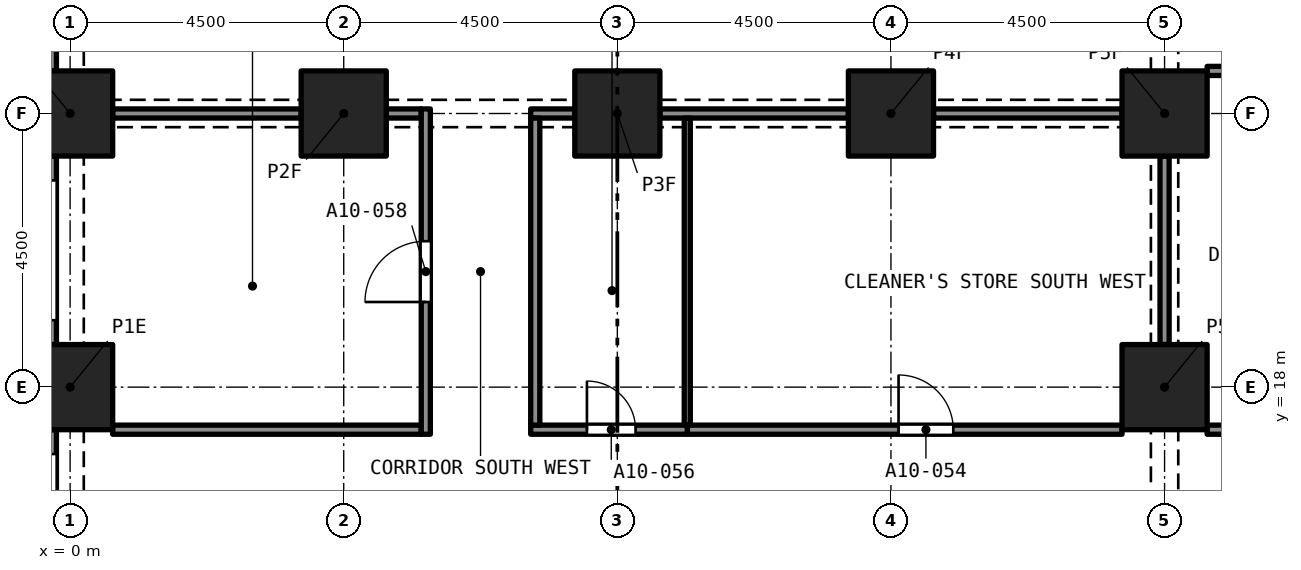
"""IFC4 building model, lengths in metres.
Left out: names, types, materials, properties, quantities, classifications, styles, units other than length and angle.
Written with IfcOpenShell. Run it as: python <this file> out.ifc"""

import sys

from ifc_helpers import new_model, si_unit, direction, frame, frame_2d, origin, origin_2d, place, context, subcontext, project, spatial, rectangle, extrude, element, fill, save


model = new_model("IFC4")
c1 = context("Model", 3, precision=1e-05, world=origin(), true_north=direction((0.0, 1.0)))
c2 = subcontext(c1, "Body", "Model", "MODEL_VIEW")
j1 = project(units=[si_unit("LENGTHUNIT", "METRE"), si_unit("PLANEANGLEUNIT", "RADIAN")], contexts=[c1])
p1 = place(None, origin())
s1 = spatial("IfcSite", under=j1, at=p1, CompositionType="ELEMENT")
p2 = place(p1, origin())
s2 = spatial("IfcBuilding", under=s1, at=p2, CompositionType="ELEMENT")
p3 = place(p2, frame((0.0, 0.0, 43.2)))
s3 = spatial("IfcBuildingStorey", under=s2, at=p3, CompositionType="ELEMENT", Elevation=43.2)
for number, where, z_axis, x_axis in (
    (1, (0.0, 18.0, 0.0), (0.0, 0.0, 1.0), (1.0, 0.0, 0.0)),
    (2, (18.0, 18.0, 0.0), (0.0, 0.0, 1.0), (1.0, 0.0, 0.0)),
    (3, (0.0, 22.5, 0.0), (0.0, 0.0, 1.0), (1.0, 0.0, 0.0)),
    (4, (4.5, 22.5, 0.0), (0.0, 0.0, 1.0), (1.0, 0.0, 0.0)),
    (5, (9.0, 22.5, 0.0), (0.0, 0.0, 1.0), (1.0, 0.0, 0.0)),
    (6, (13.5, 22.5, 0.0), (0.0, 0.0, 1.0), (1.0, 0.0, 0.0)),
    (7, (18.0, 22.5, 0.0), (0.0, 0.0, 1.0), (1.0, 0.0, 0.0)),
):
    element("IfcColumn", number, at=place(p3, frame(where, z_axis=z_axis, x_axis=x_axis)), inside=s3, PredefinedType="COLUMN", context=c2, shape_type="SweptSolid", body=[
        extrude(rectangle(XDim=1.4, YDim=1.4, at=origin_2d()), origin(), (0.0, 0.0, 1.0), 3.2),
    ])
p4 = place(p3, frame((-0.375, 23.2, 0.0), z_axis=(0.0, 0.0, 1.0), x_axis=(0.0, 1.0, 0.0)))
e8 = element("IfcWall", 8, at=p4, inside=s3, PredefinedType="SOLIDWALL", context=c2, shape_type="SweptSolid", body=[
    extrude(rectangle(XDim=3.1, YDim=0.3, at=frame_2d((1.55, 0.0))), origin(), (0.0, 0.0, 1.0), 3.2),
])
p5 = place(p4, frame((0.4, 0.0, 0.45)))
e9 = element("IfcOpeningElement", 9, at=p5, cuts=e8, PredefinedType="OPENING", context=c2, shape_type="SweptSolid", body=[
    extrude(rectangle(XDim=2.3, YDim=1.95, at=frame_2d((1.15, 0.975))), frame((0.0, 0.16, 0.0), z_axis=(0.0, -1.0, 0.0), x_axis=(1.0, 0.0, 0.0)), (0.0, 0.0, 1.0), 0.32),
])
p6 = place(p3, frame((-0.375, 18.7, 0.0), z_axis=(0.0, 0.0, 1.0), x_axis=(0.0, 1.0, 0.0)))
e10 = element("IfcWall", 10, at=p6, inside=s3, PredefinedType="SOLIDWALL", context=c2, shape_type="SweptSolid", body=[
    extrude(rectangle(XDim=3.1, YDim=0.3, at=frame_2d((1.55, 0.0))), origin(), (0.0, 0.0, 1.0), 3.2),
])
p7 = place(p6, frame((0.4, 0.0, 0.45)))
e11 = element("IfcOpeningElement", 11, at=p7, cuts=e10, PredefinedType="OPENING", context=c2, shape_type="SweptSolid", body=[
    extrude(rectangle(XDim=2.3, YDim=1.95, at=frame_2d((1.15, 0.975))), frame((0.0, 0.16, 0.0), z_axis=(0.0, -1.0, 0.0), x_axis=(1.0, 0.0, 0.0)), (0.0, 0.0, 1.0), 0.32),
])
p8 = place(p3, frame((-0.375, 14.2, 0.0), z_axis=(0.0, 0.0, 1.0), x_axis=(0.0, 1.0, 0.0)))
e12 = element("IfcWall", 12, at=p8, inside=s3, PredefinedType="SOLIDWALL", context=c2, shape_type="SweptSolid", body=[
    extrude(rectangle(XDim=3.1, YDim=0.3, at=frame_2d((1.55, 0.0))), origin(), (0.0, 0.0, 1.0), 3.2),
])
p9 = place(p8, frame((0.4, 0.0, 0.45)))
e13 = element("IfcOpeningElement", 13, at=p9, cuts=e12, PredefinedType="OPENING", context=c2, shape_type="SweptSolid", body=[
    extrude(rectangle(XDim=2.3, YDim=1.95, at=frame_2d((1.15, 0.975))), frame((0.0, 0.16, 0.0), z_axis=(0.0, -1.0, 0.0), x_axis=(1.0, 0.0, 0.0)), (0.0, 0.0, 1.0), 0.32),
])
p10 = place(p3, frame((18.7, 17.3, 0.0), z_axis=(0.0, 0.0, 1.0), x_axis=(1.0, 0.0, 0.0)))
e14 = element("IfcWall", 14, at=p10, inside=s3, PredefinedType="PARTITIONING", context=c2, shape_type="SweptSolid", body=[
    extrude(rectangle(XDim=5.075, YDim=0.15, at=frame_2d((2.538, 0.0))), origin(), (0.0, 0.0, 1.0), 2.75),
])
p11 = place(p3, frame((10.15, 17.3, 0.0), z_axis=(0.0, 0.0, 1.0), x_axis=(1.0, 0.0, 0.0)))
e15 = element("IfcWall", 15, at=p11, inside=s3, PredefinedType="PARTITIONING", context=c2, shape_type="SweptSolid", body=[
    extrude(rectangle(XDim=7.15, YDim=0.15, at=frame_2d((3.575, 0.0))), origin(), (0.0, 0.0, 1.0), 2.9),
])
p12 = place(p11, frame((3.475, 0.0, 0.0)))
e16 = element("IfcOpeningElement", 16, at=p12, cuts=e15, PredefinedType="OPENING", context=c2, shape_type="SweptSolid", body=[
    extrude(rectangle(XDim=0.9, YDim=2.1, at=frame_2d((0.45, 1.05))), frame((0.0, 0.085, 0.0), z_axis=(0.0, -1.0, 0.0), x_axis=(1.0, 0.0, 0.0)), (0.0, 0.0, 1.0), 0.17),
])
p13 = place(p3, frame((7.575, 17.3, 0.0), z_axis=(0.0, 0.0, 1.0), x_axis=(1.0, 0.0, 0.0)))
e17 = element("IfcWall", 17, at=p13, inside=s3, PredefinedType="PARTITIONING", context=c2, shape_type="SweptSolid", body=[
    extrude(rectangle(XDim=2.575, YDim=0.15, at=frame_2d((1.288, 0.0))), origin(), (0.0, 0.0, 1.0), 2.9),
])
p14 = place(p13, frame((0.925, 0.0, 0.0)))
e18 = element("IfcOpeningElement", 18, at=p14, cuts=e17, PredefinedType="OPENING", context=c2, shape_type="SweptSolid", body=[
    extrude(rectangle(XDim=0.8, YDim=2.1, at=frame_2d((0.4, 1.05))), frame((0.0, 0.085, 0.0), z_axis=(0.0, -1.0, 0.0), x_axis=(1.0, 0.0, 0.0)), (0.0, 0.0, 1.0), 0.17),
])
p15 = place(p3, frame((0.7, 17.3, 0.0), z_axis=(0.0, 0.0, 1.0), x_axis=(1.0, 0.0, 0.0)))
e19 = element("IfcWall", 19, at=p15, inside=s3, PredefinedType="PARTITIONING", context=c2, shape_type="SweptSolid", body=[
    extrude(rectangle(XDim=5.075, YDim=0.15, at=frame_2d((2.538, 0.0))), origin(), (0.0, 0.0, 1.0), 2.9),
])
p16 = place(p3, frame((18.7, 23.2, 0.0), z_axis=(0.0, 0.0, 1.0), x_axis=(1.0, 0.0, 0.0)))
e20 = element("IfcWall", 20, at=p16, inside=s3, PredefinedType="PARTITIONING", context=c2, shape_type="SweptSolid", body=[
    extrude(rectangle(XDim=5.075, YDim=0.15, at=frame_2d((2.538, 0.0))), origin(), (0.0, 0.0, 1.0), 2.75),
])
for number, where, z_axis, x_axis in (
    (21, (18.0, 18.7, 0.0), (0.0, 0.0, 1.0), (0.0, 1.0, 0.0)),
    (22, (14.2, 22.5, 0.0), (0.0, 0.0, 1.0), (1.0, 0.0, 0.0)),
    (23, (9.7, 22.5, 0.0), (0.0, 0.0, 1.0), (1.0, 0.0, 0.0)),
):
    element("IfcWall", number, at=place(p3, frame(where, z_axis=z_axis, x_axis=x_axis)), inside=s3, PredefinedType="PARTITIONING", context=c2, shape_type="SweptSolid", body=[
        extrude(rectangle(XDim=3.1, YDim=0.15, at=frame_2d((1.55, 0.0))), origin(), (0.0, 0.0, 1.0), 2.38),
    ])
p17 = place(p3, frame((7.575, 22.5, 0.0), z_axis=(0.0, 0.0, 1.0), x_axis=(1.0, 0.0, 0.0)))
e24 = element("IfcWall", 24, at=p17, inside=s3, PredefinedType="PARTITIONING", context=c2, shape_type="SweptSolid", body=[
    extrude(rectangle(XDim=0.725, YDim=0.15, at=frame_2d((0.363, 0.0))), origin(), (0.0, 0.0, 1.0), 2.38),
])
p18 = place(p3, frame((5.2, 22.5, 0.0), z_axis=(0.0, 0.0, 1.0), x_axis=(1.0, 0.0, 0.0)))
e25 = element("IfcWall", 25, at=p18, inside=s3, PredefinedType="PARTITIONING", context=c2, shape_type="SweptSolid", body=[
    extrude(rectangle(XDim=0.575, YDim=0.15, at=frame_2d((0.288, 0.0))), origin(), (0.0, 0.0, 1.0), 2.38),
])
p19 = place(p3, frame((0.7, 22.5, 0.0), z_axis=(0.0, 0.0, 1.0), x_axis=(1.0, 0.0, 0.0)))
e26 = element("IfcWall", 26, at=p19, inside=s3, PredefinedType="PARTITIONING", context=c2, shape_type="SweptSolid", body=[
    extrude(rectangle(XDim=3.1, YDim=0.15, at=frame_2d((1.55, 0.0))), origin(), (0.0, 0.0, 1.0), 2.38),
])
p20 = place(p3, frame((7.65, 17.375, 0.0), z_axis=(0.0, 0.0, 1.0), x_axis=(0.0, 1.0, 0.0)))
e27 = element("IfcWall", 27, at=p20, inside=s3, PredefinedType="PARTITIONING", context=c2, shape_type="SweptSolid", body=[
    extrude(rectangle(XDim=5.05, YDim=0.15, at=frame_2d((2.525, 0.0))), origin(), (0.0, 0.0, 1.0), 2.9),
])
p21 = place(p3, frame((5.85, 17.225, 0.0), z_axis=(0.0, 0.0, 1.0), x_axis=(0.0, 1.0, 0.0)))
e28 = element("IfcWall", 28, at=p21, inside=s3, PredefinedType="PARTITIONING", context=c2, shape_type="SweptSolid", body=[
    extrude(rectangle(XDim=5.35, YDim=0.15, at=frame_2d((2.675, 0.0))), origin(), (0.0, 0.0, 1.0), 2.9),
])
p22 = place(p21, frame((2.175, 0.0, 0.0)))
e29 = element("IfcOpeningElement", 29, at=p22, cuts=e28, PredefinedType="OPENING", context=c2, shape_type="SweptSolid", body=[
    extrude(rectangle(XDim=1.0, YDim=2.1, at=frame_2d((0.5, 1.05))), frame((0.0, 0.085, 0.0), z_axis=(0.0, -1.0, 0.0), x_axis=(1.0, 0.0, 0.0)), (0.0, 0.0, 1.0), 0.17),
])
p23 = place(p3, frame((10.15, 17.375, 0.0), z_axis=(0.0, 0.0, 1.0), x_axis=(0.0, 1.0, 0.0)))
e30 = element("IfcWall", 30, at=p23, inside=s3, PredefinedType="PARTITIONING", context=c2, shape_type="SweptSolid", body=[
    extrude(rectangle(XDim=5.05, YDim=0.1, at=frame_2d((2.525, 0.0))), origin(), (0.0, 0.0, 1.0), 2.9),
])
p24 = place(p12, origin())
e31 = element("IfcDoor", 31, at=p24, inside=s3, OperationType="SINGLE_SWING_RIGHT", PredefinedType="DOOR", context=c2, shape_type="SweptSolid", body=[
    extrude(rectangle(XDim=0.9, YDim=2.1, at=frame_2d((0.45, 1.05))), frame((0.0, 0.025, 0.0), z_axis=(0.0, -1.0, 0.0), x_axis=(1.0, 0.0, 0.0)), (0.0, 0.0, 1.0), 0.05),
])
fill(e16, e31)
p25 = place(p14, origin())
e32 = element("IfcDoor", 32, at=p25, inside=s3, OperationType="SINGLE_SWING_RIGHT", PredefinedType="DOOR", context=c2, shape_type="SweptSolid", body=[
    extrude(rectangle(XDim=0.8, YDim=2.1, at=frame_2d((0.4, 1.05))), frame((0.0, 0.025, 0.0), z_axis=(0.0, -1.0, 0.0), x_axis=(1.0, 0.0, 0.0)), (0.0, 0.0, 1.0), 0.05),
])
fill(e18, e32)
p26 = place(p22, origin())
e33 = element("IfcDoor", 33, at=p26, inside=s3, OperationType="SINGLE_SWING_LEFT", PredefinedType="DOOR", context=c2, shape_type="SweptSolid", body=[
    extrude(rectangle(XDim=1.0, YDim=2.1, at=frame_2d((0.5, 1.05))), frame((0.0, 0.025, 0.0), z_axis=(0.0, -1.0, 0.0), x_axis=(1.0, 0.0, 0.0)), (0.0, 0.0, 1.0), 0.05),
])
fill(e29, e33)
save(model, sys.argv[1])
